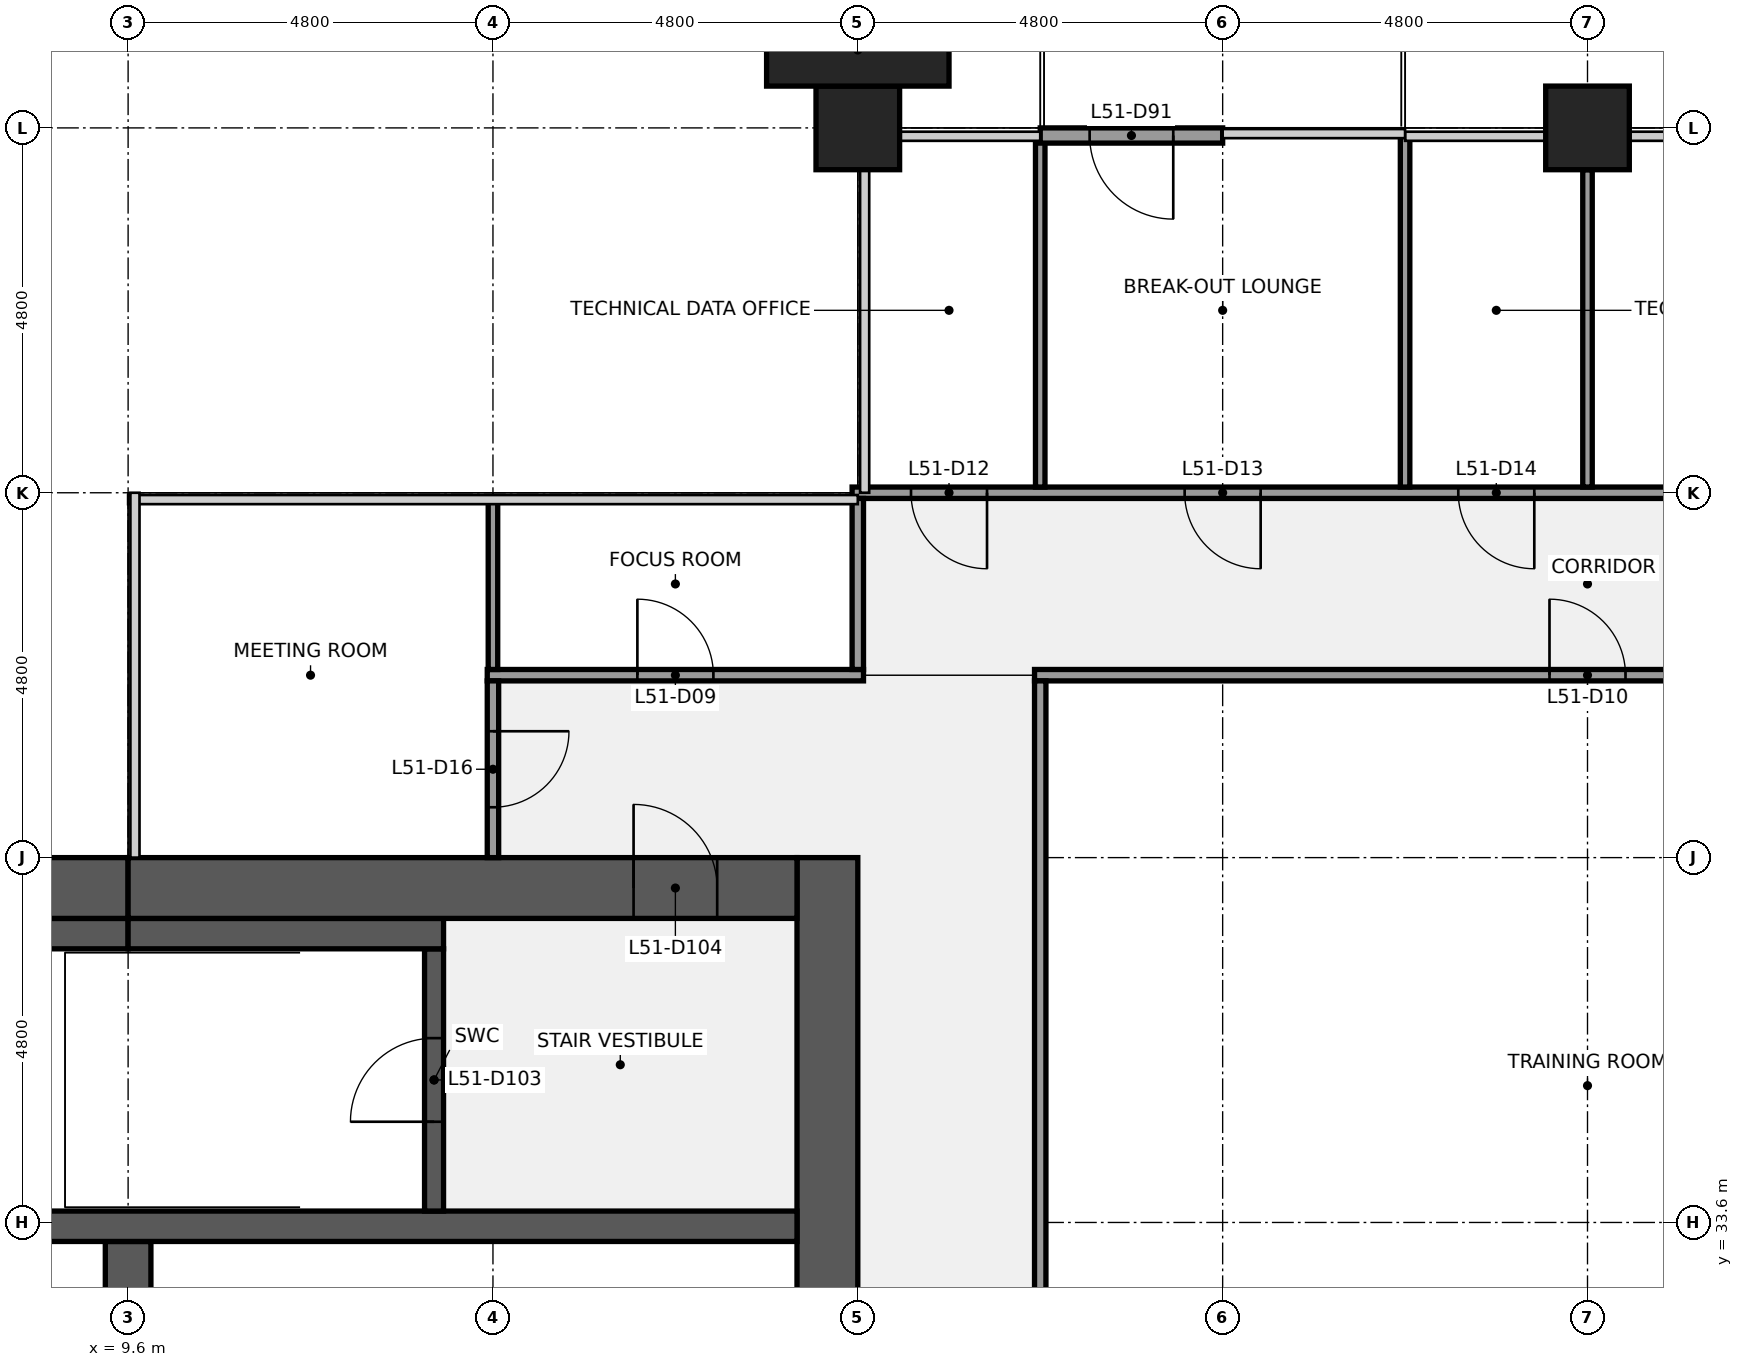
"""IFC4 building model, lengths in metres.
Left out: names, types, materials, properties, quantities, classifications, styles, units other than length and angle.
Written with IfcOpenShell. Run it as: python <this file> out.ifc"""

import sys

from ifc_helpers import new_model, si_unit, direction, frame, frame_2d, origin, origin_2d, place, context, subcontext, project, spatial, rectangle, extrude, element, fill, save


model = new_model("IFC4")
c1 = context("Model", 3, precision=1e-05, world=origin(), true_north=direction((0.0, 1.0)))
c2 = subcontext(c1, "Body", "Model", "MODEL_VIEW")
j1 = project(units=[si_unit("LENGTHUNIT", "METRE"), si_unit("PLANEANGLEUNIT", "RADIAN")], contexts=[c1])
p1 = place(None, origin())
s1 = spatial("IfcSite", under=j1, at=p1, CompositionType="ELEMENT")
p2 = place(p1, origin())
s2 = spatial("IfcBuilding", under=s1, at=p2, CompositionType="ELEMENT")
p3 = place(p2, frame((0.0, 0.0, 233.2)))
s3 = spatial("IfcBuildingStorey", under=s2, at=p3, CompositionType="ELEMENT", Elevation=233.2)
for number, where, z_axis, x_axis in (
    (1, (19.2, 48.0, 0.0), (0.0, 0.0, 1.0), (1.0, 0.0, 0.0)),
    (2, (28.8, 48.0, 0.0), (0.0, 0.0, 1.0), (1.0, 0.0, 0.0)),
):
    element("IfcColumn", number, at=place(p3, frame(where, z_axis=z_axis, x_axis=x_axis)), inside=s3, PredefinedType="COLUMN", context=c2, shape_type="SweptSolid", body=[
        extrude(rectangle(XDim=1.1, YDim=1.1, at=origin_2d()), origin(), (0.0, 0.0, 1.0), 4.0),
    ])
p4 = place(p3, frame((18.8, 38.4, 0.0), z_axis=(0.0, 0.0, 1.0), x_axis=(0.0, -1.0, 0.0)))
e3 = element("IfcWall", 3, at=p4, inside=s3, PredefinedType="SHEAR", context=c2, shape_type="SweptSolid", body=[
    extrude(rectangle(XDim=28.8, YDim=0.8, at=frame_2d((14.4, 0.0))), origin(), (0.0, 0.0, 1.0), 3.84),
])
p5 = place(p4, frame((18.3, 0.0, 0.0)))
e4 = element("IfcOpeningElement", 4, at=p5, cuts=e3, PredefinedType="OPENING", context=c2, shape_type="SweptSolid", body=[
    extrude(rectangle(XDim=1.8, YDim=2.1, at=frame_2d((0.9, 1.05))), frame((0.0, 0.41, 0.0), z_axis=(0.0, -1.0, 0.0), x_axis=(1.0, 0.0, 0.0)), (0.0, 0.0, 1.0), 0.82),
])
p6 = place(p4, frame((8.7, 0.0, 0.0)))
e5 = element("IfcOpeningElement", 5, at=p6, cuts=e3, PredefinedType="OPENING", context=c2, shape_type="SweptSolid", body=[
    extrude(rectangle(XDim=1.8, YDim=2.1, at=frame_2d((0.9, 1.05))), frame((0.0, 0.41, 0.0), z_axis=(0.0, -1.0, 0.0), x_axis=(1.0, 0.0, 0.0)), (0.0, 0.0, 1.0), 0.82),
])
p7 = place(p3, frame((9.6, 30.75, 0.0), z_axis=(0.0, 0.0, 1.0), x_axis=(0.0, 1.0, 0.0)))
e6 = element("IfcWall", 6, at=p7, inside=s3, PredefinedType="SHEAR", context=c2, shape_type="SweptSolid", body=[
    extrude(rectangle(XDim=2.6, YDim=0.6, at=frame_2d((1.3, 0.0))), origin(), (0.0, 0.0, 1.0), 3.84),
])
p8 = place(p3, frame((0.8, 33.55, 0.0), z_axis=(0.0, 0.0, 1.0), x_axis=(1.0, 0.0, 0.0)))
e7 = element("IfcWall", 7, at=p8, inside=s3, PredefinedType="SHEAR", context=c2, shape_type="SweptSolid", body=[
    extrude(rectangle(XDim=17.6, YDim=0.4, at=frame_2d((8.8, 0.0))), origin(), (0.0, 0.0, 1.0), 3.84),
])
p9 = place(p3, frame((13.625, 33.75, 0.0), z_axis=(0.0, 0.0, 1.0), x_axis=(0.0, 1.0, 0.0)))
e8 = element("IfcWall", 8, at=p9, inside=s3, PredefinedType="SHEAR", context=c2, shape_type="SweptSolid", body=[
    extrude(rectangle(XDim=3.45, YDim=0.25, at=frame_2d((1.725, 0.0))), origin(), (0.0, 0.0, 1.0), 3.84),
])
p10 = place(p9, frame((1.175, 0.0, 0.0)))
e9 = element("IfcOpeningElement", 9, at=p10, cuts=e8, PredefinedType="OPENING", context=c2, shape_type="SweptSolid", body=[
    extrude(rectangle(XDim=1.1, YDim=2.1, at=frame_2d((0.55, 1.05))), frame((0.0, 0.135, 0.0), z_axis=(0.0, -1.0, 0.0), x_axis=(1.0, 0.0, 0.0)), (0.0, 0.0, 1.0), 0.27),
])
p11 = place(p3, frame((6.25, 37.4, 0.0), z_axis=(0.0, 0.0, 1.0), x_axis=(1.0, 0.0, 0.0)))
e10 = element("IfcWall", 10, at=p11, inside=s3, PredefinedType="SHEAR", context=c2, shape_type="SweptSolid", body=[
    extrude(rectangle(XDim=3.35, YDim=0.4, at=frame_2d((1.675, 0.0))), origin(), (0.0, 0.0, 1.0), 3.84),
])
p12 = place(p3, frame((9.6, 37.4, 0.0), z_axis=(0.0, 0.0, 1.0), x_axis=(1.0, 0.0, 0.0)))
e11 = element("IfcWall", 11, at=p12, inside=s3, PredefinedType="SHEAR", context=c2, shape_type="SweptSolid", body=[
    extrude(rectangle(XDim=4.15, YDim=0.4, at=frame_2d((2.075, 0.0))), origin(), (0.0, 0.0, 1.0), 3.84),
])
p13 = place(p3, frame((0.8, 38.0, 0.0), z_axis=(0.0, 0.0, 1.0), x_axis=(1.0, 0.0, 0.0)))
e12 = element("IfcWall", 12, at=p13, inside=s3, PredefinedType="SHEAR", context=c2, shape_type="SweptSolid", body=[
    extrude(rectangle(XDim=8.8, YDim=0.8, at=frame_2d((4.4, 0.0))), origin(), (0.0, 0.0, 1.0), 3.84),
])
p14 = place(p13, frame((5.5, 0.0, 0.9)))
e13 = element("IfcOpeningElement", 13, at=p14, cuts=e12, PredefinedType="OPENING", context=c2, shape_type="SweptSolid", body=[
    extrude(rectangle(XDim=1.8, YDim=1.5, at=frame_2d((0.9, 0.75))), frame((0.0, 0.41, 0.0), z_axis=(0.0, -1.0, 0.0), x_axis=(1.0, 0.0, 0.0)), (0.0, 0.0, 1.0), 0.82),
])
p15 = place(p3, frame((9.6, 38.0, 0.0), z_axis=(0.0, 0.0, 1.0), x_axis=(1.0, 0.0, 0.0)))
e14 = element("IfcWall", 14, at=p15, inside=s3, PredefinedType="SHEAR", context=c2, shape_type="SweptSolid", body=[
    extrude(rectangle(XDim=8.8, YDim=0.8, at=frame_2d((4.4, 0.0))), origin(), (0.0, 0.0, 1.0), 3.84),
])
p16 = place(p15, frame((6.65, 0.0, 0.0)))
e15 = element("IfcOpeningElement", 15, at=p16, cuts=e14, PredefinedType="OPENING", context=c2, shape_type="SweptSolid", body=[
    extrude(rectangle(XDim=1.1, YDim=2.1, at=frame_2d((0.55, 1.05))), frame((0.0, 0.41, 0.0), z_axis=(0.0, -1.0, 0.0), x_axis=(1.0, 0.0, 0.0)), (0.0, 0.0, 1.0), 0.82),
])
p17 = place(p3, frame((14.325, 40.8, 0.0), z_axis=(0.0, 0.0, 1.0), x_axis=(1.0, 0.0, 0.0)))
e16 = element("IfcWall", 16, at=p17, inside=s3, PredefinedType="PARTITIONING", context=c2, shape_type="SweptSolid", body=[
    extrude(rectangle(XDim=4.95, YDim=0.15, at=frame_2d((2.475, 0.0))), origin(), (0.0, 0.0, 1.0), 2.87),
])
p18 = place(p17, frame((1.975, 0.0, 0.0)))
e17 = element("IfcOpeningElement", 17, at=p18, cuts=e16, PredefinedType="OPENING", context=c2, shape_type="SweptSolid", body=[
    extrude(rectangle(XDim=1.0, YDim=2.1, at=frame_2d((0.5, 1.05))), frame((0.0, 0.085, 0.0), z_axis=(0.0, -1.0, 0.0), x_axis=(1.0, 0.0, 0.0)), (0.0, 0.0, 1.0), 0.17),
])
p19 = place(p3, frame((21.525, 40.8, 0.0), z_axis=(0.0, 0.0, 1.0), x_axis=(1.0, 0.0, 0.0)))
e18 = element("IfcWall", 18, at=p19, inside=s3, PredefinedType="PARTITIONING", context=c2, shape_type="SweptSolid", body=[
    extrude(rectangle(XDim=14.55, YDim=0.15, at=frame_2d((7.275, 0.0))), origin(), (0.0, 0.0, 1.0), 2.87),
])
p20 = place(p19, frame((6.775, 0.0, 0.0)))
e19 = element("IfcOpeningElement", 19, at=p20, cuts=e18, PredefinedType="OPENING", context=c2, shape_type="SweptSolid", body=[
    extrude(rectangle(XDim=1.0, YDim=2.1, at=frame_2d((0.5, 1.05))), frame((0.0, 0.085, 0.0), z_axis=(0.0, -1.0, 0.0), x_axis=(1.0, 0.0, 0.0)), (0.0, 0.0, 1.0), 0.17),
])
p21 = place(p3, frame((19.125, 43.2, 0.0), z_axis=(0.0, 0.0, 1.0), x_axis=(1.0, 0.0, 0.0)))
e20 = element("IfcWall", 20, at=p21, inside=s3, PredefinedType="PARTITIONING", context=c2, shape_type="SweptSolid", body=[
    extrude(rectangle(XDim=19.35, YDim=0.15, at=frame_2d((9.675, 0.0))), origin(), (0.0, 0.0, 1.0), 2.87),
])
p22 = place(p21, frame((0.775, 0.0, 0.0)))
e21 = element("IfcOpeningElement", 21, at=p22, cuts=e20, PredefinedType="OPENING", context=c2, shape_type="SweptSolid", body=[
    extrude(rectangle(XDim=1.0, YDim=2.1, at=frame_2d((0.5, 1.05))), frame((0.0, 0.085, 0.0), z_axis=(0.0, -1.0, 0.0), x_axis=(1.0, 0.0, 0.0)), (0.0, 0.0, 1.0), 0.17),
])
p23 = place(p21, frame((4.375, 0.0, 0.0)))
e22 = element("IfcOpeningElement", 22, at=p23, cuts=e20, PredefinedType="OPENING", context=c2, shape_type="SweptSolid", body=[
    extrude(rectangle(XDim=1.0, YDim=2.1, at=frame_2d((0.5, 1.05))), frame((0.0, 0.085, 0.0), z_axis=(0.0, -1.0, 0.0), x_axis=(1.0, 0.0, 0.0)), (0.0, 0.0, 1.0), 0.17),
])
p24 = place(p21, frame((7.975, 0.0, 0.0)))
e23 = element("IfcOpeningElement", 23, at=p24, cuts=e20, PredefinedType="OPENING", context=c2, shape_type="SweptSolid", body=[
    extrude(rectangle(XDim=1.0, YDim=2.1, at=frame_2d((0.5, 1.05))), frame((0.0, 0.085, 0.0), z_axis=(0.0, -1.0, 0.0), x_axis=(1.0, 0.0, 0.0)), (0.0, 0.0, 1.0), 0.17),
])
p25 = place(p21, frame((13.975, 0.0, 0.0)))
e24 = element("IfcOpeningElement", 24, at=p25, cuts=e20, PredefinedType="OPENING", context=c2, shape_type="SweptSolid", body=[
    extrude(rectangle(XDim=1.0, YDim=2.1, at=frame_2d((0.5, 1.05))), frame((0.0, 0.085, 0.0), z_axis=(0.0, -1.0, 0.0), x_axis=(1.0, 0.0, 0.0)), (0.0, 0.0, 1.0), 0.17),
])
p26 = place(p3, frame((14.4, 40.875, 0.0), z_axis=(0.0, 0.0, 1.0), x_axis=(0.0, 1.0, 0.0)))
e25 = element("IfcWall", 25, at=p26, inside=s3, PredefinedType="PARTITIONING", context=c2, shape_type="SweptSolid", body=[
    extrude(rectangle(XDim=2.225, YDim=0.125, at=frame_2d((1.113, 0.0))), origin(), (0.0, 0.0, 1.0), 2.87),
])
p27 = place(p3, frame((14.4, 38.4, 0.0), z_axis=(0.0, 0.0, 1.0), x_axis=(0.0, 1.0, 0.0)))
e26 = element("IfcWall", 26, at=p27, inside=s3, PredefinedType="PARTITIONING", context=c2, shape_type="SweptSolid", body=[
    extrude(rectangle(XDim=2.325, YDim=0.15, at=frame_2d((1.163, 0.0))), origin(), (0.0, 0.0, 1.0), 2.87),
])
p28 = place(p27, frame((0.663, 0.0, 0.0)))
e27 = element("IfcOpeningElement", 27, at=p28, cuts=e26, PredefinedType="OPENING", context=c2, shape_type="SweptSolid", body=[
    extrude(rectangle(XDim=1.0, YDim=2.1, at=frame_2d((0.5, 1.05))), frame((0.0, 0.085, 0.0), z_axis=(0.0, -1.0, 0.0), x_axis=(1.0, 0.0, 0.0)), (0.0, 0.0, 1.0), 0.17),
])
p29 = place(p3, frame((19.2, 40.875, 0.0), z_axis=(0.0, 0.0, 1.0), x_axis=(0.0, 1.0, 0.0)))
e28 = element("IfcWall", 28, at=p29, inside=s3, PredefinedType="PARTITIONING", context=c2, shape_type="SweptSolid", body=[
    extrude(rectangle(XDim=2.25, YDim=0.15, at=frame_2d((1.125, 0.0))), origin(), (0.0, 0.0, 1.0), 2.87),
])
p30 = place(p3, frame((21.6, 43.275, 0.0), z_axis=(0.0, 0.0, 1.0), x_axis=(0.0, 1.0, 0.0)))
e29 = element("IfcWall", 29, at=p30, inside=s3, PredefinedType="PARTITIONING", context=c2, shape_type="SweptSolid", body=[
    extrude(rectangle(XDim=4.625, YDim=0.125, at=frame_2d((2.312, 0.0))), origin(), (0.0, 0.0, 1.0), 2.87),
])
p31 = place(p3, frame((21.6, 30.062, 0.0), z_axis=(0.0, 0.0, 1.0), x_axis=(0.0, 1.0, 0.0)))
e30 = element("IfcWall", 30, at=p31, inside=s3, PredefinedType="PARTITIONING", context=c2, shape_type="SweptSolid", body=[
    extrude(rectangle(XDim=10.663, YDim=0.15, at=frame_2d((5.331, 0.0))), origin(), (0.0, 0.0, 1.0), 2.87),
])
p32 = place(p3, frame((26.4, 43.275, 0.0), z_axis=(0.0, 0.0, 1.0), x_axis=(0.0, 1.0, 0.0)))
e31 = element("IfcWall", 31, at=p32, inside=s3, PredefinedType="PARTITIONING", context=c2, shape_type="SweptSolid", body=[
    extrude(rectangle(XDim=4.625, YDim=0.125, at=frame_2d((2.312, 0.0))), origin(), (0.0, 0.0, 1.0), 2.87),
])
p33 = place(p3, frame((28.8, 43.275, 0.0), z_axis=(0.0, 0.0, 1.0), x_axis=(0.0, 1.0, 0.0)))
e32 = element("IfcWall", 32, at=p33, inside=s3, PredefinedType="PARTITIONING", context=c2, shape_type="SweptSolid", body=[
    extrude(rectangle(XDim=4.175, YDim=0.125, at=frame_2d((2.087, 0.0))), origin(), (0.0, 0.0, 1.0), 2.87),
])
p34 = place(p3, frame((24.0, 47.9, 0.0), z_axis=(0.0, 0.0, 1.0), x_axis=(-1.0, 0.0, 0.0)))
e33 = element("IfcWall", 33, at=p34, inside=s3, PredefinedType="SOLIDWALL", context=c2, shape_type="SweptSolid", body=[
    extrude(rectangle(XDim=2.4, YDim=0.2, at=frame_2d((1.2, 0.0))), origin(), (0.0, 0.0, 1.0), 3.314),
])
p35 = place(p34, frame((0.65, 0.0, 0.0)))
e34 = element("IfcOpeningElement", 34, at=p35, cuts=e33, PredefinedType="OPENING", context=c2, shape_type="SweptSolid", body=[
    extrude(rectangle(XDim=1.1, YDim=2.1, at=frame_2d((0.55, 1.05))), frame((0.0, 0.11, 0.0), z_axis=(0.0, -1.0, 0.0), x_axis=(1.0, 0.0, 0.0)), (0.0, 0.0, 1.0), 0.22),
])
p36 = place(p3, frame((19.2, 49.025, 0.0), z_axis=(0.0, 0.0, 1.0), x_axis=(1.0, 0.0, 0.0)))
e35 = element("IfcColumn", 35, at=p36, inside=s3, PredefinedType="PILASTER", context=c2, shape_type="SweptSolid", body=[
    extrude(rectangle(XDim=2.4, YDim=0.95, at=origin_2d()), origin(), (0.0, 0.0, 1.0), 4.0),
])
p37 = place(p10, origin())
e36 = element("IfcDoor", 36, at=p37, inside=s3, OperationType="SINGLE_SWING_LEFT", PredefinedType="DOOR", context=c2, shape_type="SweptSolid", body=[
    extrude(rectangle(XDim=1.1, YDim=2.1, at=frame_2d((0.55, 1.05))), frame((0.0, 0.025, 0.0), z_axis=(0.0, -1.0, 0.0), x_axis=(1.0, 0.0, 0.0)), (0.0, 0.0, 1.0), 0.05),
])
fill(e9, e36)
p38 = place(p16, origin())
e37 = element("IfcDoor", 37, at=p38, inside=s3, OperationType="SINGLE_SWING_LEFT", PredefinedType="DOOR", context=c2, shape_type="SweptSolid", body=[
    extrude(rectangle(XDim=1.1, YDim=2.1, at=frame_2d((0.55, 1.05))), frame((0.0, 0.025, 0.0), z_axis=(0.0, -1.0, 0.0), x_axis=(1.0, 0.0, 0.0)), (0.0, 0.0, 1.0), 0.05),
])
fill(e15, e37)
p39 = place(p18, origin())
e38 = element("IfcDoor", 38, at=p39, inside=s3, OperationType="SINGLE_SWING_LEFT", PredefinedType="DOOR", context=c2, shape_type="SweptSolid", body=[
    extrude(rectangle(XDim=1.0, YDim=2.1, at=frame_2d((0.5, 1.05))), frame((0.0, 0.025, 0.0), z_axis=(0.0, -1.0, 0.0), x_axis=(1.0, 0.0, 0.0)), (0.0, 0.0, 1.0), 0.05),
])
fill(e17, e38)
p40 = place(p20, origin())
e39 = element("IfcDoor", 39, at=p40, inside=s3, OperationType="SINGLE_SWING_LEFT", PredefinedType="DOOR", context=c2, shape_type="SweptSolid", body=[
    extrude(rectangle(XDim=1.0, YDim=2.1, at=frame_2d((0.5, 1.05))), frame((0.0, 0.025, 0.0), z_axis=(0.0, -1.0, 0.0), x_axis=(1.0, 0.0, 0.0)), (0.0, 0.0, 1.0), 0.05),
])
fill(e19, e39)
p41 = place(p22, origin())
e40 = element("IfcDoor", 40, at=p41, inside=s3, OperationType="SINGLE_SWING_RIGHT", PredefinedType="DOOR", context=c2, shape_type="SweptSolid", body=[
    extrude(rectangle(XDim=1.0, YDim=2.1, at=frame_2d((0.5, 1.05))), frame((0.0, 0.025, 0.0), z_axis=(0.0, -1.0, 0.0), x_axis=(1.0, 0.0, 0.0)), (0.0, 0.0, 1.0), 0.05),
])
fill(e21, e40)
p42 = place(p23, origin())
e41 = element("IfcDoor", 41, at=p42, inside=s3, OperationType="SINGLE_SWING_RIGHT", PredefinedType="DOOR", context=c2, shape_type="SweptSolid", body=[
    extrude(rectangle(XDim=1.0, YDim=2.1, at=frame_2d((0.5, 1.05))), frame((0.0, 0.025, 0.0), z_axis=(0.0, -1.0, 0.0), x_axis=(1.0, 0.0, 0.0)), (0.0, 0.0, 1.0), 0.05),
])
fill(e22, e41)
p43 = place(p24, origin())
e42 = element("IfcDoor", 42, at=p43, inside=s3, OperationType="SINGLE_SWING_RIGHT", PredefinedType="DOOR", context=c2, shape_type="SweptSolid", body=[
    extrude(rectangle(XDim=1.0, YDim=2.1, at=frame_2d((0.5, 1.05))), frame((0.0, 0.025, 0.0), z_axis=(0.0, -1.0, 0.0), x_axis=(1.0, 0.0, 0.0)), (0.0, 0.0, 1.0), 0.05),
])
fill(e23, e42)
p44 = place(p28, origin())
e43 = element("IfcDoor", 43, at=p44, inside=s3, OperationType="SINGLE_SWING_RIGHT", PredefinedType="DOOR", context=c2, shape_type="SweptSolid", body=[
    extrude(rectangle(XDim=1.0, YDim=2.1, at=frame_2d((0.5, 1.05))), frame((0.0, 0.025, 0.0), z_axis=(0.0, -1.0, 0.0), x_axis=(1.0, 0.0, 0.0)), (0.0, 0.0, 1.0), 0.05),
])
fill(e27, e43)
p45 = place(p35, origin())
e44 = element("IfcDoor", 44, at=p45, inside=s3, OperationType="SINGLE_SWING_LEFT", PredefinedType="DOOR", context=c2, shape_type="SweptSolid", body=[
    extrude(rectangle(XDim=1.1, YDim=2.1, at=frame_2d((0.55, 1.05))), frame((0.0, 0.025, 0.0), z_axis=(0.0, -1.0, 0.0), x_axis=(1.0, 0.0, 0.0)), (0.0, 0.0, 1.0), 0.05),
])
fill(e34, e44)
save(model, sys.argv[1])
